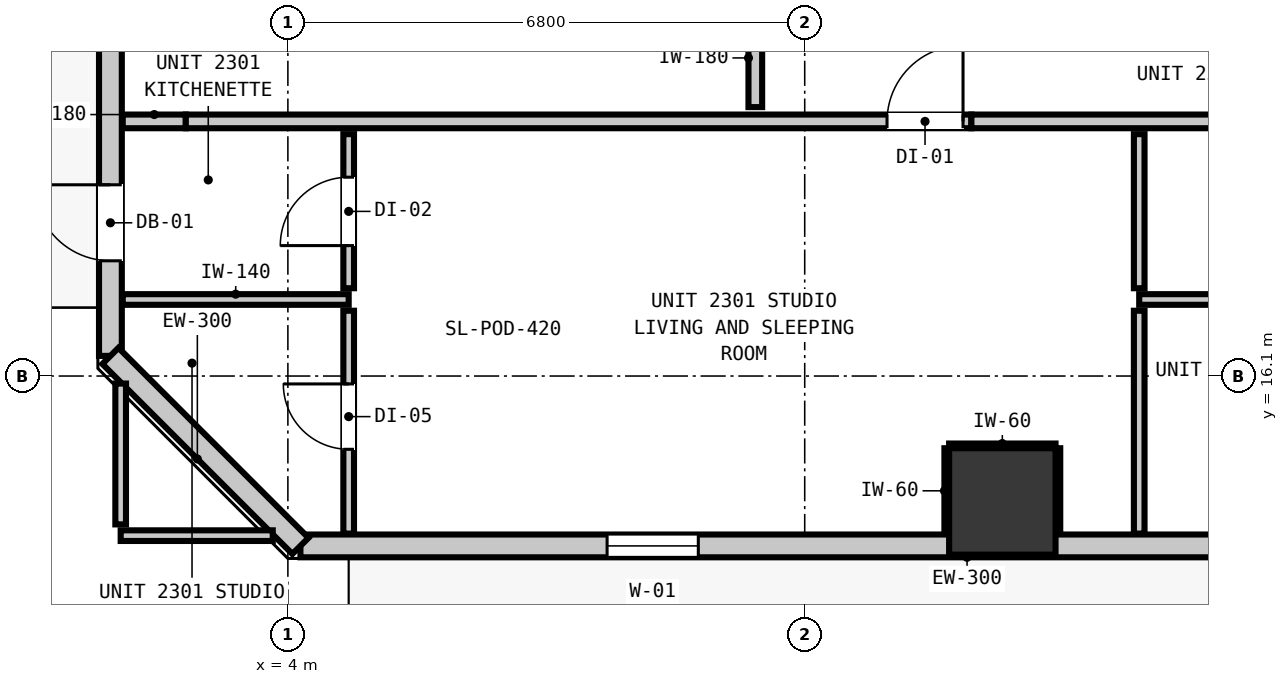
"""IFC4 building model, lengths in metres.
Left out: names, types, materials, properties, quantities, classifications, styles, units other than length and angle.
Written with IfcOpenShell. Run it as: python <this file> out.ifc"""

import sys

from ifc_helpers import new_model, si_unit, direction, frame, frame_2d, origin, origin_2d, place, context, subcontext, project, spatial, rectangle, extrude, element, fill, save


model = new_model("IFC4")
c1 = context("Model", 3, precision=1e-05, world=origin(), true_north=direction((0.0, 1.0)))
c2 = subcontext(c1, "Body", "Model", "MODEL_VIEW")
j1 = project(units=[si_unit("LENGTHUNIT", "METRE"), si_unit("PLANEANGLEUNIT", "RADIAN")], contexts=[c1])
p1 = place(None, origin())
s1 = spatial("IfcSite", under=j1, at=p1, CompositionType="ELEMENT")
p2 = place(p1, origin())
s2 = spatial("IfcBuilding", under=s1, at=p2, CompositionType="ELEMENT")
p3 = place(p2, frame((0.0, 0.0, 81.76)))
s3 = spatial("IfcBuildingStorey", under=s2, at=p3, CompositionType="ELEMENT", Elevation=81.76)
p4 = place(p3, frame((13.4, 14.45, -0.2), z_axis=(0.0, 0.0, 1.0), x_axis=(1.0, 0.0, 0.0)))
e1 = element("IfcColumn", 1, at=p4, inside=s3, PredefinedType="COLUMN", context=c2, shape_type="SweptSolid", body=[
    extrude(rectangle(XDim=1.4, YDim=1.4, at=origin_2d()), origin(), (0.0, 0.0, 1.0), 3.52),
])
p5 = place(p3, frame((1.665, 16.365, 0.0), z_axis=(0.0, 0.0, 1.0), x_axis=(0.0, 1.0, 0.0)))
e2 = element("IfcWall", 2, at=p5, inside=s3, PredefinedType="STANDARD", context=c2, shape_type="SweptSolid", body=[
    extrude(rectangle(XDim=34.67, YDim=0.3, at=frame_2d((17.335, 0.0))), origin(), (0.0, 0.0, 1.0), 3.06),
])
p6 = place(p5, frame((1.251, 0.0, 0.0)))
e3 = element("IfcOpeningElement", 3, at=p6, cuts=e2, PredefinedType="OPENING", context=c2, shape_type="SweptSolid", body=[
    extrude(rectangle(XDim=1.0, YDim=2.15, at=frame_2d((0.5, 1.075))), frame((0.0, 0.16, 0.0), z_axis=(0.0, -1.0, 0.0), x_axis=(1.0, 0.0, 0.0)), (0.0, 0.0, 1.0), 0.32),
])
p7 = place(p5, frame((32.658, 0.0, 0.85)))
e4 = element("IfcOpeningElement", 4, at=p7, cuts=e2, PredefinedType="OPENING", context=c2, shape_type="SweptSolid", body=[
    extrude(rectangle(XDim=1.2, YDim=1.8, at=frame_2d((0.6, 0.9))), frame((0.0, 0.16, 0.0), z_axis=(0.0, -1.0, 0.0), x_axis=(1.0, 0.0, 0.0)), (0.0, 0.0, 1.0), 0.32),
])
p8 = place(p5, frame((8.473, 0.0, 0.85)))
e5 = element("IfcOpeningElement", 5, at=p8, cuts=e2, PredefinedType="OPENING", context=c2, shape_type="SweptSolid", body=[
    extrude(rectangle(XDim=1.2, YDim=1.8, at=frame_2d((0.6, 0.9))), frame((0.0, 0.16, 0.0), z_axis=(0.0, -1.0, 0.0), x_axis=(1.0, 0.0, 0.0)), (0.0, 0.0, 1.0), 0.32),
])
p9 = place(p5, frame((11.623, 0.0, 0.85)))
e6 = element("IfcOpeningElement", 6, at=p9, cuts=e2, PredefinedType="OPENING", context=c2, shape_type="SweptSolid", body=[
    extrude(rectangle(XDim=1.2, YDim=1.8, at=frame_2d((0.6, 0.9))), frame((0.0, 0.16, 0.0), z_axis=(0.0, -1.0, 0.0), x_axis=(1.0, 0.0, 0.0)), (0.0, 0.0, 1.0), 0.32),
])
p10 = place(p5, frame((18.007, 0.0, 0.85)))
e7 = element("IfcOpeningElement", 7, at=p10, cuts=e2, PredefinedType="OPENING", context=c2, shape_type="SweptSolid", body=[
    extrude(rectangle(XDim=1.2, YDim=1.8, at=frame_2d((0.6, 0.9))), frame((0.0, 0.16, 0.0), z_axis=(0.0, -1.0, 0.0), x_axis=(1.0, 0.0, 0.0)), (0.0, 0.0, 1.0), 0.32),
])
p11 = place(p5, frame((21.058, 0.0, 0.85)))
e8 = element("IfcOpeningElement", 8, at=p11, cuts=e2, PredefinedType="OPENING", context=c2, shape_type="SweptSolid", body=[
    extrude(rectangle(XDim=1.2, YDim=1.8, at=frame_2d((0.6, 0.9))), frame((0.0, 0.16, 0.0), z_axis=(0.0, -1.0, 0.0), x_axis=(1.0, 0.0, 0.0)), (0.0, 0.0, 1.0), 0.32),
])
p12 = place(p3, frame((41.635, 13.865, 0.0), z_axis=(0.0, 0.0, 1.0), x_axis=(-1.0, 0.0, 0.0)))
e9 = element("IfcWall", 9, at=p12, inside=s3, PredefinedType="STANDARD", context=c2, shape_type="SweptSolid", body=[
    extrude(rectangle(XDim=37.47, YDim=0.3, at=frame_2d((18.735, 0.0))), origin(), (0.0, 0.0, 1.0), 3.06),
])
p13 = place(p12, frame((1.251, 0.0, 0.0)))
e10 = element("IfcOpeningElement", 10, at=p13, cuts=e9, PredefinedType="OPENING", context=c2, shape_type="SweptSolid", body=[
    extrude(rectangle(XDim=1.0, YDim=2.15, at=frame_2d((0.5, 1.075))), frame((0.0, 0.16, 0.0), z_axis=(0.0, -1.0, 0.0), x_axis=(1.0, 0.0, 0.0)), (0.0, 0.0, 1.0), 0.32),
])
p14 = place(p12, frame((32.235, 0.0, 0.85)))
e11 = element("IfcOpeningElement", 11, at=p14, cuts=e9, PredefinedType="OPENING", context=c2, shape_type="SweptSolid", body=[
    extrude(rectangle(XDim=1.2, YDim=1.8, at=frame_2d((0.6, 0.9))), frame((0.0, 0.16, 0.0), z_axis=(0.0, -1.0, 0.0), x_axis=(1.0, 0.0, 0.0)), (0.0, 0.0, 1.0), 0.32),
])
p15 = place(p12, frame((21.774, 0.0, 0.85)))
e12 = element("IfcOpeningElement", 12, at=p15, cuts=e9, PredefinedType="OPENING", context=c2, shape_type="SweptSolid", body=[
    extrude(rectangle(XDim=0.58, YDim=1.5, at=frame_2d((0.29, 0.75))), frame((0.0, 0.16, 0.0), z_axis=(0.0, -1.0, 0.0), x_axis=(1.0, 0.0, 0.0)), (0.0, 0.0, 1.0), 0.32),
])
p16 = place(p12, frame((23.963, 0.0, 0.85)))
e13 = element("IfcOpeningElement", 13, at=p16, cuts=e9, PredefinedType="OPENING", context=c2, shape_type="SweptSolid", body=[
    extrude(rectangle(XDim=1.2, YDim=1.8, at=frame_2d((0.6, 0.9))), frame((0.0, 0.16, 0.0), z_axis=(0.0, -1.0, 0.0), x_axis=(1.0, 0.0, 0.0)), (0.0, 0.0, 1.0), 0.32),
])
p17 = place(p12, frame((10.64, 0.0, 0.85)))
e14 = element("IfcOpeningElement", 14, at=p17, cuts=e9, PredefinedType="OPENING", context=c2, shape_type="SweptSolid", body=[
    extrude(rectangle(XDim=0.9, YDim=1.5, at=frame_2d((0.45, 0.75))), frame((0.0, 0.16, 0.0), z_axis=(0.0, -1.0, 0.0), x_axis=(1.0, 0.0, 0.0)), (0.0, 0.0, 1.0), 0.32),
])
p18 = place(p12, frame((14.959, 0.0, 0.85)))
e15 = element("IfcOpeningElement", 15, at=p18, cuts=e9, PredefinedType="OPENING", context=c2, shape_type="SweptSolid", body=[
    extrude(rectangle(XDim=1.2, YDim=1.8, at=frame_2d((0.6, 0.9))), frame((0.0, 0.16, 0.0), z_axis=(0.0, -1.0, 0.0), x_axis=(1.0, 0.0, 0.0)), (0.0, 0.0, 1.0), 0.32),
])
p19 = place(p12, frame((6.359, 0.0, 0.85)))
e16 = element("IfcOpeningElement", 16, at=p19, cuts=e9, PredefinedType="OPENING", context=c2, shape_type="SweptSolid", body=[
    extrude(rectangle(XDim=1.2, YDim=1.8, at=frame_2d((0.6, 0.9))), frame((0.0, 0.16, 0.0), z_axis=(0.0, -1.0, 0.0), x_axis=(1.0, 0.0, 0.0)), (0.0, 0.0, 1.0), 0.32),
])
p20 = place(p3, frame((4.165, 13.865, 0.0), z_axis=(0.0, 0.0, 1.0), x_axis=(-0.707106781187, 0.707106781187, 0.0)))
e17 = element("IfcWall", 17, at=p20, inside=s3, PredefinedType="STANDARD", context=c2, shape_type="SweptSolid", body=[
    extrude(rectangle(XDim=3.536, YDim=0.3, at=frame_2d((1.768, 0.0))), origin(), (0.0, 0.0, 1.0), 3.06),
])
p21 = place(p3, frame((1.827, 19.45, 0.0), z_axis=(0.0, 0.0, 1.0), x_axis=(1.0, 0.0, 0.0)))
e18 = element("IfcWall", 18, at=p21, inside=s3, PredefinedType="PARTITIONING", context=c2, shape_type="SweptSolid", body=[
    extrude(rectangle(XDim=0.83, YDim=0.18, at=frame_2d((0.415, 0.0))), origin(), (0.0, 0.0, 1.0), 3.06),
])
p22 = place(p3, frame((2.657, 19.45, 0.0), z_axis=(0.0, 0.0, 1.0), x_axis=(1.0, 0.0, 0.0)))
e19 = element("IfcWall", 19, at=p22, inside=s3, PredefinedType="PARTITIONING", context=c2, shape_type="SweptSolid", body=[
    extrude(rectangle(XDim=10.336, YDim=0.18, at=frame_2d((5.168, 0.0))), origin(), (0.0, 0.0, 1.0), 2.445),
])
p23 = place(p22, frame((9.226, 0.0, 0.0)))
e20 = element("IfcOpeningElement", 20, at=p23, cuts=e19, PredefinedType="OPENING", context=c2, shape_type="SweptSolid", body=[
    extrude(rectangle(XDim=1.0, YDim=2.15, at=frame_2d((0.5, 1.075))), frame((0.0, 0.1, 0.0), z_axis=(0.0, -1.0, 0.0), x_axis=(1.0, 0.0, 0.0)), (0.0, 0.0, 1.0), 0.2),
])
p24 = place(p3, frame((12.993, 19.45, 0.0), z_axis=(0.0, 0.0, 1.0), x_axis=(1.0, 0.0, 0.0)))
e21 = element("IfcWall", 21, at=p24, inside=s3, PredefinedType="PARTITIONING", context=c2, shape_type="SweptSolid", body=[
    extrude(rectangle(XDim=30.98, YDim=0.18, at=frame_2d((15.49, 0.0))), origin(), (0.0, 0.0, 1.0), 3.06),
])
p25 = place(p24, frame((6.788, 0.0, 0.0)))
e22 = element("IfcOpeningElement", 22, at=p25, cuts=e21, PredefinedType="OPENING", context=c2, shape_type="SweptSolid", body=[
    extrude(rectangle(XDim=1.0, YDim=2.15, at=frame_2d((0.5, 1.075))), frame((0.0, 0.1, 0.0), z_axis=(0.0, -1.0, 0.0), x_axis=(1.0, 0.0, 0.0)), (0.0, 0.0, 1.0), 0.2),
])
p26 = place(p24, frame((16.356, 0.0, 0.0)))
e23 = element("IfcOpeningElement", 23, at=p26, cuts=e21, PredefinedType="OPENING", context=c2, shape_type="SweptSolid", body=[
    extrude(rectangle(XDim=1.0, YDim=2.15, at=frame_2d((0.5, 1.075))), frame((0.0, 0.1, 0.0), z_axis=(0.0, -1.0, 0.0), x_axis=(1.0, 0.0, 0.0)), (0.0, 0.0, 1.0), 0.2),
])
p27 = place(p24, frame((23.733, 0.0, 0.0)))
e24 = element("IfcOpeningElement", 24, at=p27, cuts=e21, PredefinedType="OPENING", context=c2, shape_type="SweptSolid", body=[
    extrude(rectangle(XDim=1.0, YDim=2.15, at=frame_2d((0.5, 1.075))), frame((0.0, 0.1, 0.0), z_axis=(0.0, -1.0, 0.0), x_axis=(1.0, 0.0, 0.0)), (0.0, 0.0, 1.0), 0.2),
])
p28 = place(p3, frame((1.8, 14.0, 0.0), z_axis=(0.0, 0.0, 1.0), x_axis=(1.0, 0.0, 0.0)))
e25 = element("IfcWall", 25, at=p28, inside=s3, PredefinedType="PARTITIONING", context=c2, shape_type="SweptSolid", body=[
    extrude(rectangle(XDim=2.001, YDim=0.14, at=frame_2d((1.0, 0.0))), origin(), (0.0, 0.0, 1.0), 3.06),
])
p29 = place(p3, frame((1.827, 17.107, 0.0), z_axis=(0.0, 0.0, 1.0), x_axis=(1.0, 0.0, 0.0)))
e26 = element("IfcWall", 26, at=p29, inside=s3, PredefinedType="PARTITIONING", context=c2, shape_type="SweptSolid", body=[
    extrude(rectangle(XDim=2.973, YDim=0.14, at=frame_2d((1.487, 0.0))), origin(), (0.0, 0.0, 1.0), 3.06),
])
p30 = place(p3, frame((15.201, 17.107, 0.0), z_axis=(0.0, 0.0, 1.0), x_axis=(1.0, 0.0, 0.0)))
e27 = element("IfcWall", 27, at=p30, inside=s3, PredefinedType="PARTITIONING", context=c2, shape_type="SweptSolid", body=[
    extrude(rectangle(XDim=3.741, YDim=0.14, at=frame_2d((1.871, 0.0))), origin(), (0.0, 0.0, 1.0), 3.06),
])
p31 = place(p3, frame((10.15, 19.638, 0.0), z_axis=(0.0, 0.0, 1.0), x_axis=(0.0, 1.0, 0.0)))
e28 = element("IfcWall", 28, at=p31, inside=s3, PredefinedType="PARTITIONING", context=c2, shape_type="SweptSolid", body=[
    extrude(rectangle(XDim=1.294, YDim=0.18, at=frame_2d((0.647, 0.0))), origin(), (0.0, 0.0, 1.0), 3.06),
])
p32 = place(p3, frame((1.8, 14.148, 0.0), z_axis=(0.0, 0.0, 1.0), x_axis=(0.0, 1.0, 0.0)))
e29 = element("IfcWall", 29, at=p32, inside=s3, PredefinedType="PARTITIONING", context=c2, shape_type="SweptSolid", body=[
    extrude(rectangle(XDim=1.853, YDim=0.14, at=frame_2d((0.927, 0.0))), origin(), (0.0, 0.0, 1.0), 3.06),
])
p33 = place(p3, frame((4.8, 14.027, 0.0), z_axis=(0.0, 0.0, 1.0), x_axis=(0.0, 1.0, 0.0)))
e30 = element("IfcWall", 30, at=p33, inside=s3, PredefinedType="PARTITIONING", context=c2, shape_type="SweptSolid", body=[
    extrude(rectangle(XDim=2.932, YDim=0.14, at=frame_2d((1.466, 0.0))), origin(), (0.0, 0.0, 1.0), 3.06),
])
p34 = place(p33, frame((1.109, 0.0, 0.0)))
e31 = element("IfcOpeningElement", 31, at=p34, cuts=e30, PredefinedType="OPENING", context=c2, shape_type="SweptSolid", body=[
    extrude(rectangle(XDim=0.86, YDim=2.02, at=frame_2d((0.43, 1.01))), frame((0.0, 0.08, 0.0), z_axis=(0.0, -1.0, 0.0), x_axis=(1.0, 0.0, 0.0)), (0.0, 0.0, 1.0), 0.16),
])
p35 = place(p3, frame((4.8, 17.255, 0.0), z_axis=(0.0, 0.0, 1.0), x_axis=(0.0, 1.0, 0.0)))
e32 = element("IfcWall", 32, at=p35, inside=s3, PredefinedType="PARTITIONING", context=c2, shape_type="SweptSolid", body=[
    extrude(rectangle(XDim=2.027, YDim=0.14, at=frame_2d((1.014, 0.0))), origin(), (0.0, 0.0, 1.0), 3.06),
])
p36 = place(p35, frame((0.561, 0.0, 0.0)))
e33 = element("IfcOpeningElement", 33, at=p36, cuts=e32, PredefinedType="OPENING", context=c2, shape_type="SweptSolid", body=[
    extrude(rectangle(XDim=0.9, YDim=2.1, at=frame_2d((0.45, 1.05))), frame((0.0, 0.08, 0.0), z_axis=(0.0, -1.0, 0.0), x_axis=(1.0, 0.0, 0.0)), (0.0, 0.0, 1.0), 0.16),
])
p37 = place(p3, frame((15.201, 14.027, 0.0), z_axis=(0.0, 0.0, 1.0), x_axis=(0.0, 1.0, 0.0)))
e34 = element("IfcWall", 34, at=p37, inside=s3, PredefinedType="PARTITIONING", context=c2, shape_type="SweptSolid", body=[
    extrude(rectangle(XDim=2.932, YDim=0.14, at=frame_2d((1.466, 0.0))), origin(), (0.0, 0.0, 1.0), 3.06),
])
p38 = place(p3, frame((15.201, 17.255, 0.0), z_axis=(0.0, 0.0, 1.0), x_axis=(0.0, 1.0, 0.0)))
e35 = element("IfcWall", 35, at=p38, inside=s3, PredefinedType="PARTITIONING", context=c2, shape_type="SweptSolid", body=[
    extrude(rectangle(XDim=2.027, YDim=0.14, at=frame_2d((1.014, 0.0))), origin(), (0.0, 0.0, 1.0), 3.06),
])
p39 = place(p3, frame((12.7, 15.182, 0.0), z_axis=(0.0, 0.0, 1.0), x_axis=(1.0, 0.0, 0.0)))
e36 = element("IfcWall", 36, at=p39, inside=s3, PredefinedType="PARTITIONING", context=c2, shape_type="SweptSolid", body=[
    extrude(rectangle(XDim=1.4, YDim=0.06, at=frame_2d((0.7, 0.0))), origin(), (0.0, 0.0, 1.0), 1.45),
])
for number, where, z_axis, x_axis in (
    (37, (12.668, 14.03, 0.0), (0.0, 0.0, 1.0), (0.0, 1.0, 0.0)),
    (38, (14.132, 14.03, 0.0), (0.0, 0.0, 1.0), (0.0, 1.0, 0.0)),
):
    element("IfcWall", number, at=place(p3, frame(where, z_axis=z_axis, x_axis=x_axis)), inside=s3, PredefinedType="PARTITIONING", context=c2, shape_type="SweptSolid", body=[
        extrude(rectangle(XDim=1.12, YDim=0.06, at=frame_2d((0.56, 0.0))), origin(), (0.0, 0.0, 1.0), 1.45),
    ])
p40 = place(p6, origin())
e39 = element("IfcDoor", 39, at=p40, inside=s3, OperationType="SINGLE_SWING_RIGHT", PredefinedType="DOOR", context=c2, shape_type="SweptSolid", body=[
    extrude(rectangle(XDim=1.0, YDim=2.15, at=frame_2d((0.5, 1.075))), frame((0.0, 0.025, 0.0), z_axis=(0.0, -1.0, 0.0), x_axis=(1.0, 0.0, 0.0)), (0.0, 0.0, 1.0), 0.05),
])
fill(e3, e39)
p41 = place(p14, origin())
e40 = element("IfcWindow", 40, at=p41, inside=s3, PartitioningType="SINGLE_PANEL", PredefinedType="WINDOW", context=c2, shape_type="SweptSolid", body=[
    extrude(rectangle(XDim=1.2, YDim=1.8, at=frame_2d((0.6, 0.9))), frame((0.0, 0.03, 0.0), z_axis=(0.0, -1.0, 0.0), x_axis=(1.0, 0.0, 0.0)), (0.0, 0.0, 1.0), 0.06),
])
fill(e11, e40)
p42 = place(p23, origin())
e41 = element("IfcDoor", 41, at=p42, inside=s3, OperationType="SINGLE_SWING_RIGHT", PredefinedType="DOOR", context=c2, shape_type="SweptSolid", body=[
    extrude(rectangle(XDim=1.0, YDim=2.15, at=frame_2d((0.5, 1.075))), frame((0.0, 0.025, 0.0), z_axis=(0.0, -1.0, 0.0), x_axis=(1.0, 0.0, 0.0)), (0.0, 0.0, 1.0), 0.05),
])
fill(e20, e41)
p43 = place(p36, origin())
e42 = element("IfcDoor", 42, at=p43, inside=s3, OperationType="SINGLE_SWING_LEFT", PredefinedType="DOOR", context=c2, shape_type="SweptSolid", body=[
    extrude(rectangle(XDim=0.9, YDim=2.1, at=frame_2d((0.45, 1.05))), frame((0.0, 0.025, 0.0), z_axis=(0.0, -1.0, 0.0), x_axis=(1.0, 0.0, 0.0)), (0.0, 0.0, 1.0), 0.05),
])
fill(e33, e42)
p44 = place(p34, origin())
e43 = element("IfcDoor", 43, at=p44, inside=s3, OperationType="SINGLE_SWING_RIGHT", PredefinedType="DOOR", context=c2, shape_type="SweptSolid", body=[
    extrude(rectangle(XDim=0.86, YDim=2.02, at=frame_2d((0.43, 1.01))), frame((0.0, 0.025, 0.0), z_axis=(0.0, -1.0, 0.0), x_axis=(1.0, 0.0, 0.0)), (0.0, 0.0, 1.0), 0.05),
])
fill(e31, e43)
save(model, sys.argv[1])
